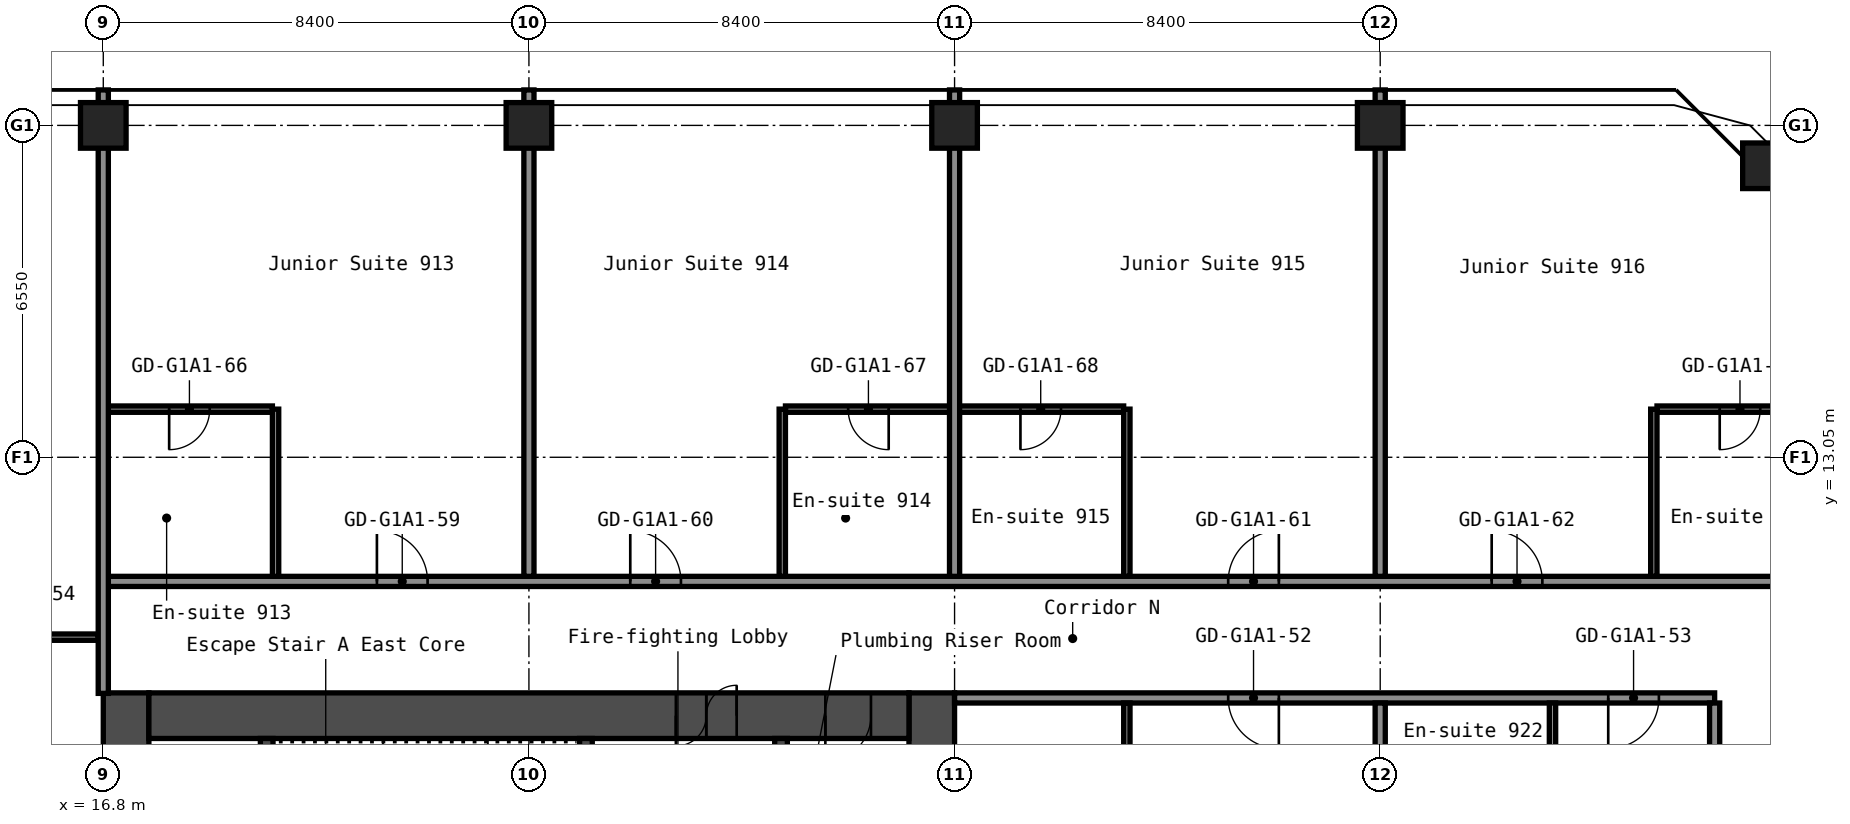
"""IFC4 building model, lengths in metres.
Left out: names, types, materials, properties, quantities, classifications, styles, units other than length and angle.
Written with IfcOpenShell. Run it as: python <this file> out.ifc"""

import sys

from ifc_helpers import new_model, si_unit, direction, frame, frame_2d, origin, origin_2d, place, context, subcontext, project, spatial, rectangle, hollow_rectangle, extrude, element, fill, save


model = new_model("IFC4")
c1 = context("Model", 3, precision=1e-05, world=origin(), true_north=direction((0.0, 1.0)))
c2 = subcontext(c1, "Body", "Model", "MODEL_VIEW")
j1 = project(units=[si_unit("LENGTHUNIT", "METRE"), si_unit("PLANEANGLEUNIT", "RADIAN")], contexts=[c1])
p1 = place(None, origin())
s1 = spatial("IfcSite", under=j1, at=p1, CompositionType="ELEMENT")
p2 = place(p1, origin())
s2 = spatial("IfcBuilding", under=s1, at=p2, CompositionType="ELEMENT")
p3 = place(p2, frame((0.0, 0.0, 35.8)))
s3 = spatial("IfcBuildingStorey", under=s2, at=p3, CompositionType="ELEMENT", Elevation=35.8)
for number, where, z_axis, x_axis in (
    (1, (16.8, 19.6, 0.0), (0.0, 0.0, 1.0), (1.0, 0.0, 0.0)),
    (2, (25.2, 19.6, 0.0), (0.0, 0.0, 1.0), (1.0, 0.0, 0.0)),
    (3, (33.6, 19.6, 0.0), (0.0, 0.0, 1.0), (1.0, 0.0, 0.0)),
    (4, (42.0, 19.6, 0.0), (0.0, 0.0, 1.0), (1.0, 0.0, 0.0)),
    (5, (49.603, 18.803, 0.0), (0.0, 0.0, 1.0), (1.0, 0.0, 0.0)),
):
    element("IfcColumn", number, at=place(p3, frame(where, z_axis=z_axis, x_axis=x_axis)), inside=s3, PredefinedType="COLUMN", context=c2, shape_type="SweptSolid", body=[
        extrude(hollow_rectangle(XDim=0.9, YDim=0.9, WallThickness=0.036, at=origin_2d()), origin(), (0.0, 0.0, 1.0), 2.8),
    ])
p4 = place(p3, frame((17.25, -8.4, 0.0), z_axis=(0.0, 0.0, 1.0), x_axis=(0.0, 1.0, 0.0)))
e6 = element("IfcWall", 6, at=p4, inside=s3, PredefinedType="SHEAR", context=c2, shape_type="SweptSolid", body=[
    extrude(rectangle(XDim=16.8, YDim=0.9, at=frame_2d((8.4, 0.0))), origin(), (0.0, 0.0, 1.0), 2.8),
])
p5 = place(p4, frame((12.75, 0.0, 0.0)))
e7 = element("IfcOpeningElement", 7, at=p5, cuts=e6, PredefinedType="OPENING", context=c2, shape_type="SweptSolid", body=[
    extrude(rectangle(XDim=1.2, YDim=2.1, at=frame_2d((0.6, 1.05))), frame((0.0, 0.46, 0.0), z_axis=(0.0, -1.0, 0.0), x_axis=(1.0, 0.0, 0.0)), (0.0, 0.0, 1.0), 0.92),
])
p6 = place(p4, frame((2.85, 0.0, 0.0)))
e8 = element("IfcOpeningElement", 8, at=p6, cuts=e6, PredefinedType="OPENING", context=c2, shape_type="SweptSolid", body=[
    extrude(rectangle(XDim=1.2, YDim=2.1, at=frame_2d((0.6, 1.05))), frame((0.0, 0.46, 0.0), z_axis=(0.0, -1.0, 0.0), x_axis=(1.0, 0.0, 0.0)), (0.0, 0.0, 1.0), 0.92),
])
p7 = place(p3, frame((33.15, -8.4, 0.0), z_axis=(0.0, 0.0, 1.0), x_axis=(0.0, 1.0, 0.0)))
e9 = element("IfcWall", 9, at=p7, inside=s3, PredefinedType="SHEAR", context=c2, shape_type="SweptSolid", body=[
    extrude(rectangle(XDim=16.8, YDim=0.9, at=frame_2d((8.4, 0.0))), origin(), (0.0, 0.0, 1.0), 2.8),
])
p8 = place(p3, frame((17.7, 7.95, 0.0), z_axis=(0.0, 0.0, 1.0), x_axis=(1.0, 0.0, 0.0)))
e10 = element("IfcWall", 10, at=p8, inside=s3, PredefinedType="SHEAR", context=c2, shape_type="SweptSolid", body=[
    extrude(rectangle(XDim=15.0, YDim=0.9, at=frame_2d((7.5, 0.0))), origin(), (0.0, 0.0, 1.0), 2.8),
])
p9 = place(p8, frame((10.4, 0.0, 0.0)))
e11 = element("IfcOpeningElement", 11, at=p9, cuts=e10, PredefinedType="OPENING", context=c2, shape_type="SweptSolid", body=[
    extrude(rectangle(XDim=1.2, YDim=2.1, at=frame_2d((0.6, 1.05))), frame((0.0, 0.46, 0.0), z_axis=(0.0, -1.0, 0.0), x_axis=(1.0, 0.0, 0.0)), (0.0, 0.0, 1.0), 0.92),
])
p10 = place(p8, frame((13.35, 0.0, 0.0)))
e12 = element("IfcOpeningElement", 12, at=p10, cuts=e10, PredefinedType="OPENING", context=c2, shape_type="SweptSolid", body=[
    extrude(rectangle(XDim=0.9, YDim=2.1, at=frame_2d((0.45, 1.05))), frame((0.0, 0.46, 0.0), z_axis=(0.0, -1.0, 0.0), x_axis=(1.0, 0.0, 0.0)), (0.0, 0.0, 1.0), 0.92),
])
p11 = place(p3, frame((20.025, 1.2, 0.0), z_axis=(0.0, 0.0, 1.0), x_axis=(0.0, 1.0, 0.0)))
e13 = element("IfcWall", 13, at=p11, inside=s3, PredefinedType="SHEAR", context=c2, shape_type="SweptSolid", body=[
    extrude(rectangle(XDim=6.3, YDim=0.25, at=frame_2d((3.15, 0.0))), origin(), (0.0, 0.0, 1.0), 2.8),
])
p12 = place(p3, frame((26.325, 3.75, 0.0), z_axis=(0.0, 0.0, 1.0), x_axis=(0.0, 1.0, 0.0)))
e14 = element("IfcWall", 14, at=p12, inside=s3, PredefinedType="SHEAR", context=c2, shape_type="SweptSolid", body=[
    extrude(rectangle(XDim=3.75, YDim=0.25, at=frame_2d((1.875, 0.0))), origin(), (0.0, 0.0, 1.0), 2.8),
])
p13 = place(p12, frame((1.25, 0.0, 0.0)))
e15 = element("IfcOpeningElement", 15, at=p13, cuts=e14, PredefinedType="OPENING", context=c2, shape_type="SweptSolid", body=[
    extrude(rectangle(XDim=1.2, YDim=2.1, at=frame_2d((0.6, 1.05))), frame((0.0, 0.135, 0.0), z_axis=(0.0, -1.0, 0.0), x_axis=(1.0, 0.0, 0.0)), (0.0, 0.0, 1.0), 0.27),
])
p14 = place(p3, frame((30.175, 1.45, 0.0), z_axis=(0.0, 0.0, 1.0), x_axis=(0.0, 1.0, 0.0)))
e16 = element("IfcWall", 16, at=p14, inside=s3, PredefinedType="SHEAR", context=c2, shape_type="SweptSolid", body=[
    extrude(rectangle(XDim=6.05, YDim=0.25, at=frame_2d((3.025, 0.0))), origin(), (0.0, 0.0, 1.0), 2.8),
])
p15 = place(p14, frame((2.625, 0.0, 0.0)))
e17 = element("IfcOpeningElement", 17, at=p15, cuts=e16, PredefinedType="OPENING", context=c2, shape_type="SweptSolid", body=[
    extrude(rectangle(XDim=1.1, YDim=2.1, at=frame_2d((0.55, 1.05))), frame((0.0, 0.135, 0.0), z_axis=(0.0, -1.0, 0.0), x_axis=(1.0, 0.0, 0.0)), (0.0, 0.0, 1.0), 0.27),
])
p16 = place(p3, frame((33.6, 8.3, 0.0), z_axis=(0.0, 0.0, 1.0), x_axis=(1.0, 0.0, 0.0)))
e18 = element("IfcWall", 18, at=p16, inside=s3, PredefinedType="PARTITIONING", context=c2, shape_type="SweptSolid", body=[
    extrude(rectangle(XDim=15.0, YDim=0.2, at=frame_2d((7.5, 0.0))), origin(), (0.0, 0.0, 1.0), 2.8),
])
p17 = place(p16, frame((5.4, 0.0, 0.0)))
e19 = element("IfcOpeningElement", 19, at=p17, cuts=e18, PredefinedType="OPENING", context=c2, shape_type="SweptSolid", body=[
    extrude(rectangle(XDim=1.0, YDim=2.1, at=frame_2d((0.5, 1.05))), frame((0.0, 0.11, 0.0), z_axis=(0.0, -1.0, 0.0), x_axis=(1.0, 0.0, 0.0)), (0.0, 0.0, 1.0), 0.22),
])
p18 = place(p16, frame((12.9, 0.0, 0.0)))
e20 = element("IfcOpeningElement", 20, at=p18, cuts=e18, PredefinedType="OPENING", context=c2, shape_type="SweptSolid", body=[
    extrude(rectangle(XDim=1.0, YDim=2.1, at=frame_2d((0.5, 1.05))), frame((0.0, 0.11, 0.0), z_axis=(0.0, -1.0, 0.0), x_axis=(1.0, 0.0, 0.0)), (0.0, 0.0, 1.0), 0.22),
])
p19 = place(p3, frame((13.462, 9.5, 0.0), z_axis=(0.0, 0.0, 1.0), x_axis=(1.0, 0.0, 0.0)))
e21 = element("IfcWall", 21, at=p19, inside=s3, PredefinedType="PARTITIONING", context=c2, shape_type="SweptSolid", body=[
    extrude(rectangle(XDim=3.238, YDim=0.125, at=frame_2d((1.619, 0.0))), origin(), (0.0, 0.0, 1.0), 2.8),
])
p20 = place(p19, frame((1.238, 0.0, 0.0)))
e22 = element("IfcOpeningElement", 22, at=p20, cuts=e21, PredefinedType="OPENING", context=c2, shape_type="SweptSolid", body=[
    extrude(rectangle(XDim=0.8, YDim=2.1, at=frame_2d((0.4, 1.05))), frame((0.0, 0.073, 0.0), z_axis=(0.0, -1.0, 0.0), x_axis=(1.0, 0.0, 0.0)), (0.0, 0.0, 1.0), 0.145),
])
p21 = place(p3, frame((16.8, 10.6, 0.0), z_axis=(0.0, 0.0, 1.0), x_axis=(1.0, 0.0, 0.0)))
e23 = element("IfcWall", 23, at=p21, inside=s3, PredefinedType="PARTITIONING", context=c2, shape_type="SweptSolid", body=[
    extrude(rectangle(XDim=34.3, YDim=0.2, at=frame_2d((17.15, 0.0))), origin(), (0.0, 0.0, 1.0), 2.8),
])
p22 = place(p21, frame((5.4, 0.0, 0.0)))
e24 = element("IfcOpeningElement", 24, at=p22, cuts=e23, PredefinedType="OPENING", context=c2, shape_type="SweptSolid", body=[
    extrude(rectangle(XDim=1.0, YDim=2.1, at=frame_2d((0.5, 1.05))), frame((0.0, 0.11, 0.0), z_axis=(0.0, -1.0, 0.0), x_axis=(1.0, 0.0, 0.0)), (0.0, 0.0, 1.0), 0.22),
])
p23 = place(p21, frame((10.4, 0.0, 0.0)))
e25 = element("IfcOpeningElement", 25, at=p23, cuts=e23, PredefinedType="OPENING", context=c2, shape_type="SweptSolid", body=[
    extrude(rectangle(XDim=1.0, YDim=2.1, at=frame_2d((0.5, 1.05))), frame((0.0, 0.11, 0.0), z_axis=(0.0, -1.0, 0.0), x_axis=(1.0, 0.0, 0.0)), (0.0, 0.0, 1.0), 0.22),
])
p24 = place(p21, frame((22.2, 0.0, 0.0)))
e26 = element("IfcOpeningElement", 26, at=p24, cuts=e23, PredefinedType="OPENING", context=c2, shape_type="SweptSolid", body=[
    extrude(rectangle(XDim=1.0, YDim=2.1, at=frame_2d((0.5, 1.05))), frame((0.0, 0.11, 0.0), z_axis=(0.0, -1.0, 0.0), x_axis=(1.0, 0.0, 0.0)), (0.0, 0.0, 1.0), 0.22),
])
p25 = place(p21, frame((27.4, 0.0, 0.0)))
e27 = element("IfcOpeningElement", 27, at=p25, cuts=e23, PredefinedType="OPENING", context=c2, shape_type="SweptSolid", body=[
    extrude(rectangle(XDim=1.0, YDim=2.1, at=frame_2d((0.5, 1.05))), frame((0.0, 0.11, 0.0), z_axis=(0.0, -1.0, 0.0), x_axis=(1.0, 0.0, 0.0)), (0.0, 0.0, 1.0), 0.22),
])
p26 = place(p3, frame((16.9, 14.0, 0.0), z_axis=(0.0, 0.0, 1.0), x_axis=(1.0, 0.0, 0.0)))
e28 = element("IfcWall", 28, at=p26, inside=s3, PredefinedType="PARTITIONING", context=c2, shape_type="SweptSolid", body=[
    extrude(rectangle(XDim=3.238, YDim=0.125, at=frame_2d((1.619, 0.0))), origin(), (0.0, 0.0, 1.0), 2.8),
])
p27 = place(p26, frame((1.2, 0.0, 0.0)))
e29 = element("IfcOpeningElement", 29, at=p27, cuts=e28, PredefinedType="OPENING", context=c2, shape_type="SweptSolid", body=[
    extrude(rectangle(XDim=0.8, YDim=2.1, at=frame_2d((0.4, 1.05))), frame((0.0, 0.073, 0.0), z_axis=(0.0, -1.0, 0.0), x_axis=(1.0, 0.0, 0.0)), (0.0, 0.0, 1.0), 0.145),
])
p28 = place(p3, frame((30.262, 14.0, 0.0), z_axis=(0.0, 0.0, 1.0), x_axis=(1.0, 0.0, 0.0)))
e30 = element("IfcWall", 30, at=p28, inside=s3, PredefinedType="PARTITIONING", context=c2, shape_type="SweptSolid", body=[
    extrude(rectangle(XDim=6.675, YDim=0.125, at=frame_2d((3.337, 0.0))), origin(), (0.0, 0.0, 1.0), 2.8),
])
p29 = place(p28, frame((1.238, 0.0, 0.0)))
e31 = element("IfcOpeningElement", 31, at=p29, cuts=e30, PredefinedType="OPENING", context=c2, shape_type="SweptSolid", body=[
    extrude(rectangle(XDim=0.8, YDim=2.1, at=frame_2d((0.4, 1.05))), frame((0.0, 0.073, 0.0), z_axis=(0.0, -1.0, 0.0), x_axis=(1.0, 0.0, 0.0)), (0.0, 0.0, 1.0), 0.145),
])
p30 = place(p28, frame((4.637, 0.0, 0.0)))
e32 = element("IfcOpeningElement", 32, at=p30, cuts=e30, PredefinedType="OPENING", context=c2, shape_type="SweptSolid", body=[
    extrude(rectangle(XDim=0.8, YDim=2.1, at=frame_2d((0.4, 1.05))), frame((0.0, 0.073, 0.0), z_axis=(0.0, -1.0, 0.0), x_axis=(1.0, 0.0, 0.0)), (0.0, 0.0, 1.0), 0.145),
])
p31 = place(p3, frame((47.462, 14.0, 0.0), z_axis=(0.0, 0.0, 1.0), x_axis=(1.0, 0.0, 0.0)))
e33 = element("IfcWall", 33, at=p31, inside=s3, PredefinedType="PARTITIONING", context=c2, shape_type="SweptSolid", body=[
    extrude(rectangle(XDim=3.638, YDim=0.125, at=frame_2d((1.819, 0.0))), origin(), (0.0, 0.0, 1.0), 2.8),
])
p32 = place(p31, frame((1.238, 0.0, 0.0)))
e34 = element("IfcOpeningElement", 34, at=p32, cuts=e33, PredefinedType="OPENING", context=c2, shape_type="SweptSolid", body=[
    extrude(rectangle(XDim=0.8, YDim=2.1, at=frame_2d((0.4, 1.05))), frame((0.0, 0.073, 0.0), z_axis=(0.0, -1.0, 0.0), x_axis=(1.0, 0.0, 0.0)), (0.0, 0.0, 1.0), 0.145),
])
p33 = place(p3, frame((16.8, 8.39, 0.0), z_axis=(0.0, 0.0, 1.0), x_axis=(0.0, 1.0, 0.0)))
e35 = element("IfcWall", 35, at=p33, inside=s3, PredefinedType="PARTITIONING", context=c2, shape_type="SweptSolid", body=[
    extrude(rectangle(XDim=11.91, YDim=0.2, at=frame_2d((5.955, 0.0))), origin(), (0.0, 0.0, 1.0), 2.8),
])
p34 = place(p3, frame((20.2, 10.7, 0.0), z_axis=(0.0, 0.0, 1.0), x_axis=(0.0, 1.0, 0.0)))
e36 = element("IfcWall", 36, at=p34, inside=s3, PredefinedType="PARTITIONING", context=c2, shape_type="SweptSolid", body=[
    extrude(rectangle(XDim=3.3, YDim=0.125, at=frame_2d((1.65, 0.0))), origin(), (0.0, 0.0, 1.0), 2.8),
])
p35 = place(p3, frame((25.2, 10.7, 0.0), z_axis=(0.0, 0.0, 1.0), x_axis=(0.0, 1.0, 0.0)))
e37 = element("IfcWall", 37, at=p35, inside=s3, PredefinedType="PARTITIONING", context=c2, shape_type="SweptSolid", body=[
    extrude(rectangle(XDim=9.6, YDim=0.2, at=frame_2d((4.8, 0.0))), origin(), (0.0, 0.0, 1.0), 2.8),
])
p36 = place(p3, frame((30.2, 10.7, 0.0), z_axis=(0.0, 0.0, 1.0), x_axis=(0.0, 1.0, 0.0)))
e38 = element("IfcWall", 38, at=p36, inside=s3, PredefinedType="PARTITIONING", context=c2, shape_type="SweptSolid", body=[
    extrude(rectangle(XDim=3.3, YDim=0.125, at=frame_2d((1.65, 0.0))), origin(), (0.0, 0.0, 1.0), 2.8),
])
p37 = place(p3, frame((33.6, 10.7, 0.0), z_axis=(0.0, 0.0, 1.0), x_axis=(0.0, 1.0, 0.0)))
e39 = element("IfcWall", 39, at=p37, inside=s3, PredefinedType="PARTITIONING", context=c2, shape_type="SweptSolid", body=[
    extrude(rectangle(XDim=9.6, YDim=0.2, at=frame_2d((4.8, 0.0))), origin(), (0.0, 0.0, 1.0), 2.8),
])
for number, where, z_axis, x_axis in (
    (40, (37.0, 4.9, 0.0), (0.0, 0.0, 1.0), (0.0, 1.0, 0.0)),
    (41, (37.0, 10.7, 0.0), (0.0, 0.0, 1.0), (0.0, 1.0, 0.0)),
):
    element("IfcWall", number, at=place(p3, frame(where, z_axis=z_axis, x_axis=x_axis)), inside=s3, PredefinedType="PARTITIONING", context=c2, shape_type="SweptSolid", body=[
        extrude(rectangle(XDim=3.3, YDim=0.125, at=frame_2d((1.65, 0.0))), origin(), (0.0, 0.0, 1.0), 2.8),
    ])
p38 = place(p3, frame((42.0, -8.2, 0.0), z_axis=(0.0, 0.0, 1.0), x_axis=(0.0, 1.0, 0.0)))
e42 = element("IfcWall", 42, at=p38, inside=s3, PredefinedType="PARTITIONING", context=c2, shape_type="SweptSolid", body=[
    extrude(rectangle(XDim=16.4, YDim=0.2, at=frame_2d((8.2, 0.0))), origin(), (0.0, 0.0, 1.0), 2.8),
])
p39 = place(p3, frame((42.0, 10.7, 0.0), z_axis=(0.0, 0.0, 1.0), x_axis=(0.0, 1.0, 0.0)))
e43 = element("IfcWall", 43, at=p39, inside=s3, PredefinedType="PARTITIONING", context=c2, shape_type="SweptSolid", body=[
    extrude(rectangle(XDim=9.6, YDim=0.2, at=frame_2d((4.8, 0.0))), origin(), (0.0, 0.0, 1.0), 2.8),
])
for number, where, z_axis, x_axis in (
    (44, (45.4, 4.9, 0.0), (0.0, 0.0, 1.0), (0.0, 1.0, 0.0)),
    (45, (47.4, 10.7, 0.0), (0.0, 0.0, 1.0), (0.0, 1.0, 0.0)),
):
    element("IfcWall", number, at=place(p3, frame(where, z_axis=z_axis, x_axis=x_axis)), inside=s3, PredefinedType="PARTITIONING", context=c2, shape_type="SweptSolid", body=[
        extrude(rectangle(XDim=3.3, YDim=0.125, at=frame_2d((1.65, 0.0))), origin(), (0.0, 0.0, 1.0), 2.8),
    ])
p40 = place(p3, frame((48.6, -8.2, 0.0), z_axis=(0.0, 0.0, 1.0), x_axis=(0.0, 1.0, 0.0)))
e46 = element("IfcWall", 46, at=p40, inside=s3, PredefinedType="PARTITIONING", context=c2, shape_type="SweptSolid", body=[
    extrude(rectangle(XDim=16.4, YDim=0.2, at=frame_2d((8.2, 0.0))), origin(), (0.0, 0.0, 1.0), 2.8),
])
p41 = place(p9, origin())
e47 = element("IfcDoor", 47, at=p41, inside=s3, OperationType="DOUBLE_DOOR_SINGLE_SWING", PredefinedType="DOOR", context=c2, shape_type="SweptSolid", body=[
    extrude(rectangle(XDim=1.2, YDim=2.1, at=frame_2d((0.6, 1.05))), frame((0.0, 0.025, 0.0), z_axis=(0.0, -1.0, 0.0), x_axis=(1.0, 0.0, 0.0)), (0.0, 0.0, 1.0), 0.05),
])
fill(e11, e47)
p42 = place(p10, origin())
e48 = element("IfcDoor", 48, at=p42, inside=s3, OperationType="SINGLE_SWING_LEFT", PredefinedType="DOOR", context=c2, shape_type="SweptSolid", body=[
    extrude(rectangle(XDim=0.9, YDim=2.1, at=frame_2d((0.45, 1.05))), frame((0.0, 0.025, 0.0), z_axis=(0.0, -1.0, 0.0), x_axis=(1.0, 0.0, 0.0)), (0.0, 0.0, 1.0), 0.05),
])
fill(e12, e48)
p43 = place(p17, origin())
e49 = element("IfcDoor", 49, at=p43, inside=s3, OperationType="SINGLE_SWING_RIGHT", PredefinedType="DOOR", context=c2, shape_type="SweptSolid", body=[
    extrude(rectangle(XDim=1.0, YDim=2.1, at=frame_2d((0.5, 1.05))), frame((0.0, 0.025, 0.0), z_axis=(0.0, -1.0, 0.0), x_axis=(1.0, 0.0, 0.0)), (0.0, 0.0, 1.0), 0.05),
])
fill(e19, e49)
p44 = place(p18, origin())
e50 = element("IfcDoor", 50, at=p44, inside=s3, OperationType="SINGLE_SWING_LEFT", PredefinedType="DOOR", context=c2, shape_type="SweptSolid", body=[
    extrude(rectangle(XDim=1.0, YDim=2.1, at=frame_2d((0.5, 1.05))), frame((0.0, 0.025, 0.0), z_axis=(0.0, -1.0, 0.0), x_axis=(1.0, 0.0, 0.0)), (0.0, 0.0, 1.0), 0.05),
])
fill(e20, e50)
p45 = place(p22, origin())
e51 = element("IfcDoor", 51, at=p45, inside=s3, OperationType="SINGLE_SWING_RIGHT", PredefinedType="DOOR", context=c2, shape_type="SweptSolid", body=[
    extrude(rectangle(XDim=1.0, YDim=2.1, at=frame_2d((0.5, 1.05))), frame((0.0, 0.025, 0.0), z_axis=(0.0, -1.0, 0.0), x_axis=(1.0, 0.0, 0.0)), (0.0, 0.0, 1.0), 0.05),
])
fill(e24, e51)
p46 = place(p23, origin())
e52 = element("IfcDoor", 52, at=p46, inside=s3, OperationType="SINGLE_SWING_RIGHT", PredefinedType="DOOR", context=c2, shape_type="SweptSolid", body=[
    extrude(rectangle(XDim=1.0, YDim=2.1, at=frame_2d((0.5, 1.05))), frame((0.0, 0.025, 0.0), z_axis=(0.0, -1.0, 0.0), x_axis=(1.0, 0.0, 0.0)), (0.0, 0.0, 1.0), 0.05),
])
fill(e25, e52)
p47 = place(p24, origin())
e53 = element("IfcDoor", 53, at=p47, inside=s3, OperationType="SINGLE_SWING_LEFT", PredefinedType="DOOR", context=c2, shape_type="SweptSolid", body=[
    extrude(rectangle(XDim=1.0, YDim=2.1, at=frame_2d((0.5, 1.05))), frame((0.0, 0.025, 0.0), z_axis=(0.0, -1.0, 0.0), x_axis=(1.0, 0.0, 0.0)), (0.0, 0.0, 1.0), 0.05),
])
fill(e26, e53)
p48 = place(p25, origin())
e54 = element("IfcDoor", 54, at=p48, inside=s3, OperationType="SINGLE_SWING_RIGHT", PredefinedType="DOOR", context=c2, shape_type="SweptSolid", body=[
    extrude(rectangle(XDim=1.0, YDim=2.1, at=frame_2d((0.5, 1.05))), frame((0.0, 0.025, 0.0), z_axis=(0.0, -1.0, 0.0), x_axis=(1.0, 0.0, 0.0)), (0.0, 0.0, 1.0), 0.05),
])
fill(e27, e54)
p49 = place(p27, origin())
e55 = element("IfcDoor", 55, at=p49, inside=s3, OperationType="SINGLE_SWING_LEFT", PredefinedType="DOOR", context=c2, shape_type="SweptSolid", body=[
    extrude(rectangle(XDim=0.8, YDim=2.1, at=frame_2d((0.4, 1.05))), frame((0.0, 0.025, 0.0), z_axis=(0.0, -1.0, 0.0), x_axis=(1.0, 0.0, 0.0)), (0.0, 0.0, 1.0), 0.05),
])
fill(e29, e55)
p50 = place(p29, origin())
e56 = element("IfcDoor", 56, at=p50, inside=s3, OperationType="SINGLE_SWING_RIGHT", PredefinedType="DOOR", context=c2, shape_type="SweptSolid", body=[
    extrude(rectangle(XDim=0.8, YDim=2.1, at=frame_2d((0.4, 1.05))), frame((0.0, 0.025, 0.0), z_axis=(0.0, -1.0, 0.0), x_axis=(1.0, 0.0, 0.0)), (0.0, 0.0, 1.0), 0.05),
])
fill(e31, e56)
p51 = place(p30, origin())
e57 = element("IfcDoor", 57, at=p51, inside=s3, OperationType="SINGLE_SWING_LEFT", PredefinedType="DOOR", context=c2, shape_type="SweptSolid", body=[
    extrude(rectangle(XDim=0.8, YDim=2.1, at=frame_2d((0.4, 1.05))), frame((0.0, 0.025, 0.0), z_axis=(0.0, -1.0, 0.0), x_axis=(1.0, 0.0, 0.0)), (0.0, 0.0, 1.0), 0.05),
])
fill(e32, e57)
p52 = place(p32, origin())
e58 = element("IfcDoor", 58, at=p52, inside=s3, OperationType="SINGLE_SWING_LEFT", PredefinedType="DOOR", context=c2, shape_type="SweptSolid", body=[
    extrude(rectangle(XDim=0.8, YDim=2.1, at=frame_2d((0.4, 1.05))), frame((0.0, 0.025, 0.0), z_axis=(0.0, -1.0, 0.0), x_axis=(1.0, 0.0, 0.0)), (0.0, 0.0, 1.0), 0.05),
])
fill(e34, e58)
save(model, sys.argv[1])
